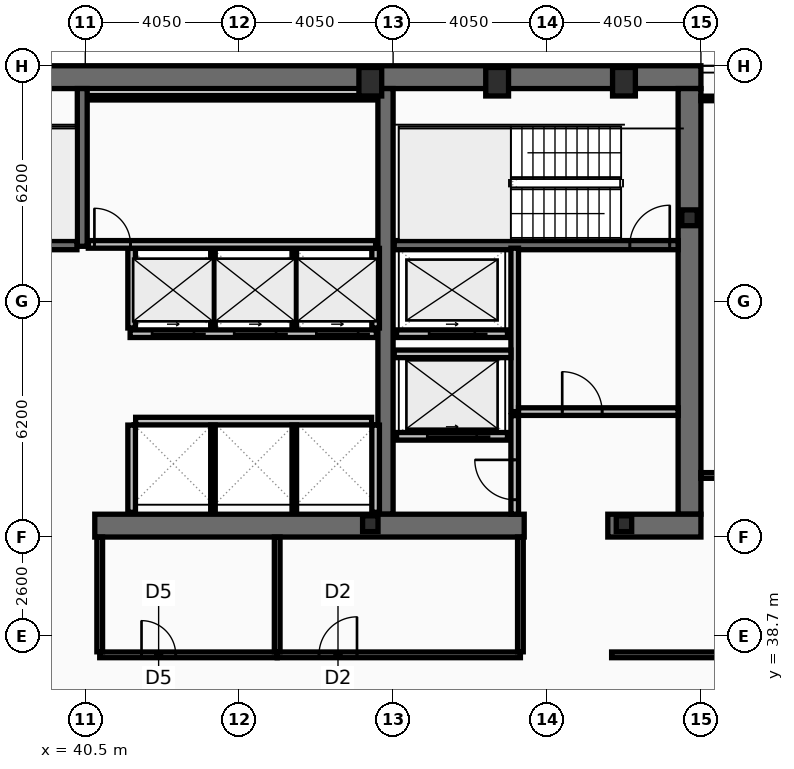
"""IFC4 building model, lengths in metres.
Left out: names, types, materials, properties, quantities, classifications, styles, units other than length and angle.
Written with IfcOpenShell. Run it as: python <this file> out.ifc"""

import sys

from ifc_helpers import new_model, si_unit, direction, frame, frame_2d, origin, origin_2d, place, context, subcontext, project, spatial, rectangle, hollow_rectangle, i_section, extrude, element, fill, save


model = new_model("IFC4")
c1 = context("Model", 3, precision=1e-05, world=origin(), true_north=direction((0.0, 1.0)))
c2 = subcontext(c1, "Body", "Model", "MODEL_VIEW")
j1 = project(units=[si_unit("LENGTHUNIT", "METRE"), si_unit("PLANEANGLEUNIT", "RADIAN")], contexts=[c1])
p1 = place(None, origin())
s1 = spatial("IfcSite", under=j1, at=p1, CompositionType="ELEMENT")
p2 = place(p1, origin())
s2 = spatial("IfcBuilding", under=s1, at=p2, CompositionType="ELEMENT")
p3 = place(p2, frame((0.0, 0.0, 199.4)))
s3 = spatial("IfcBuildingStorey", under=s2, at=p3, CompositionType="ELEMENT", Elevation=199.4)
p4 = place(p3, frame((16.2, 53.4, 0.0), z_axis=(0.0, 0.0, 1.0), x_axis=(1.0, 0.0, 0.0)))
e1 = element("IfcWall", 1, at=p4, inside=s3, PredefinedType="SHEAR", context=c2, shape_type="SweptSolid", body=[
    extrude(rectangle(XDim=40.5, YDim=0.6, at=frame_2d((20.25, 0.0))), origin(), (0.0, 0.0, 1.0), 3.44),
])
p5 = place(p3, frame((56.4, 53.1, 0.0), z_axis=(0.0, 0.0, 1.0), x_axis=(0.0, -1.0, 0.0)))
e2 = element("IfcWall", 2, at=p5, inside=s3, PredefinedType="SHEAR", context=c2, shape_type="SweptSolid", body=[
    extrude(rectangle(XDim=11.2, YDim=0.6, at=frame_2d((5.6, 0.0))), origin(), (0.0, 0.0, 1.0), 3.44),
])
p6 = place(p3, frame((48.4, 41.9, 0.0), z_axis=(0.0, 0.0, 1.0), x_axis=(0.0, 1.0, 0.0)))
e3 = element("IfcWall", 3, at=p6, inside=s3, PredefinedType="SHEAR", context=c2, shape_type="SweptSolid", body=[
    extrude(rectangle(XDim=11.2, YDim=0.4, at=frame_2d((5.6, 0.0))), origin(), (0.0, 0.0, 1.0), 3.44),
])
p7 = place(p3, frame((52.05, 41.6, 0.0), z_axis=(0.0, 0.0, 1.0), x_axis=(-1.0, 0.0, 0.0)))
e4 = element("IfcWall", 4, at=p7, inside=s3, PredefinedType="SHEAR", context=c2, shape_type="SweptSolid", body=[
    extrude(rectangle(XDim=11.3, YDim=0.6, at=frame_2d((5.65, 0.0))), origin(), (0.0, 0.0, 1.0), 3.44),
])
p8 = place(p3, frame((56.7, 41.6, 0.0), z_axis=(0.0, 0.0, 1.0), x_axis=(-1.0, 0.0, 0.0)))
e5 = element("IfcWall", 5, at=p8, inside=s3, PredefinedType="SHEAR", context=c2, shape_type="SweptSolid", body=[
    extrude(rectangle(XDim=2.45, YDim=0.6, at=frame_2d((1.225, 0.0))), origin(), (0.0, 0.0, 1.0), 3.44),
])
p9 = place(p3, frame((40.42, 48.95, 0.0), z_axis=(0.0, 0.0, 1.0), x_axis=(0.0, 1.0, 0.0)))
e6 = element("IfcWall", 6, at=p9, inside=s3, PredefinedType="SHEAR", context=c2, shape_type="SweptSolid", body=[
    extrude(rectangle(XDim=4.15, YDim=0.26, at=frame_2d((2.075, 0.0))), origin(), (0.0, 0.0, 1.0), 3.44),
])
p10 = place(p3, frame((48.63, 48.98, 0.0), z_axis=(0.0, 0.0, 1.0), x_axis=(1.0, 0.0, 0.0)))
e7 = element("IfcWall", 7, at=p10, inside=s3, PredefinedType="SHEAR", context=c2, shape_type="SweptSolid", body=[
    extrude(rectangle(XDim=7.47, YDim=0.24, at=frame_2d((3.735, 0.0))), origin(), (0.0, 0.0, 1.0), 3.44),
])
p11 = place(p10, frame((6.2, 0.0, 0.0)))
e8 = element("IfcOpeningElement", 8, at=p11, cuts=e7, PredefinedType="OPENING", context=c2, shape_type="SweptSolid", body=[
    extrude(rectangle(XDim=1.05, YDim=2.15, at=frame_2d((0.525, 1.075))), frame((0.0, 0.13, 0.0), z_axis=(0.0, -1.0, 0.0), x_axis=(1.0, 0.0, 0.0)), (0.0, 0.0, 1.0), 0.26),
])
p12 = place(p3, frame((32.72, 48.98, 0.0), z_axis=(0.0, 0.0, 1.0), x_axis=(1.0, 0.0, 0.0)))
e9 = element("IfcWall", 9, at=p12, inside=s3, PredefinedType="SHEAR", context=c2, shape_type="SweptSolid", body=[
    extrude(rectangle(XDim=7.56, YDim=0.24, at=frame_2d((3.78, 0.0))), origin(), (0.0, 0.0, 1.0), 3.44),
])
p13 = place(p12, frame((0.22, 0.0, 0.0)))
e10 = element("IfcOpeningElement", 10, at=p13, cuts=e9, PredefinedType="OPENING", context=c2, shape_type="SweptSolid", body=[
    extrude(rectangle(XDim=1.05, YDim=2.15, at=frame_2d((0.525, 1.075))), frame((0.0, 0.13, 0.0), z_axis=(0.0, -1.0, 0.0), x_axis=(1.0, 0.0, 0.0)), (0.0, 0.0, 1.0), 0.26),
])
for number, where, z_axis, x_axis in (
    (11, (48.0, 53.28, 0.0), (0.0, 0.0, 1.0), (1.0, 0.0, 0.0)),
    (12, (51.337, 53.28, 0.0), (0.0, 0.0, 1.0), (1.0, 0.0, 0.0)),
    (13, (54.675, 53.28, 0.0), (0.0, 0.0, 1.0), (1.0, 0.0, 0.0)),
):
    element("IfcColumn", number, at=place(p3, frame(where, z_axis=z_axis, x_axis=x_axis)), inside=s3, PredefinedType="COLUMN", context=c2, shape_type="SweptSolid", body=[
        extrude(hollow_rectangle(XDim=0.6, YDim=0.75, WallThickness=0.045, at=origin_2d()), origin(), (0.0, 0.0, 1.0), 3.6),
    ])
for number, where, z_axis, x_axis in (
    (14, (56.4, 49.7, 0.0), (0.0, 0.0, 1.0), (1.0, 0.0, 0.0)),
    (15, (48.0, 41.65, 0.0), (0.0, 0.0, 1.0), (1.0, 0.0, 0.0)),
    (16, (54.675, 41.65, 0.0), (0.0, 0.0, 1.0), (1.0, 0.0, 0.0)),
):
    element("IfcColumn", number, at=place(p3, frame(where, z_axis=z_axis, x_axis=x_axis)), inside=s3, PredefinedType="COLUMN", context=c2, shape_type="SweptSolid", body=[
        extrude(i_section(OverallWidth=0.406, OverallDepth=0.416, WebThickness=0.03, FlangeThickness=0.048, at=origin_2d()), origin(), (0.0, 0.0, 1.0), 3.6),
    ])
p14 = place(p3, frame((51.61, 43.95, 0.0), z_axis=(0.0, 0.0, 1.0), x_axis=(-1.0, 0.0, 0.0)))
e17 = element("IfcWall", 17, at=p14, inside=s3, PredefinedType="PARTITIONING", context=c2, shape_type="SweptSolid", body=[
    extrude(rectangle(XDim=2.92, YDim=0.2, at=frame_2d((1.46, 0.0))), origin(), (0.0, 0.0, 1.0), 3.44),
])
p15 = place(p14, frame((0.81, 0.0, 0.0)))
e18 = element("IfcOpeningElement", 18, at=p15, cuts=e17, PredefinedType="OPENING", context=c2, shape_type="SweptSolid", body=[
    extrude(rectangle(XDim=1.3, YDim=2.18, at=frame_2d((0.65, 1.09))), frame((0.0, 0.11, 0.0), z_axis=(0.0, -1.0, 0.0), x_axis=(1.0, 0.0, 0.0)), (0.0, 0.0, 1.0), 0.22),
])
p16 = place(p3, frame((51.61, 46.65, 0.0), z_axis=(0.0, 0.0, 1.0), x_axis=(-1.0, 0.0, 0.0)))
e19 = element("IfcWall", 19, at=p16, inside=s3, PredefinedType="PARTITIONING", context=c2, shape_type="SweptSolid", body=[
    extrude(rectangle(XDim=2.92, YDim=0.2, at=frame_2d((1.46, 0.0))), origin(), (0.0, 0.0, 1.0), 3.44),
])
p17 = place(p16, frame((0.86, 0.0, 0.0)))
e20 = element("IfcOpeningElement", 20, at=p17, cuts=e19, PredefinedType="OPENING", context=c2, shape_type="SweptSolid", body=[
    extrude(rectangle(XDim=1.2, YDim=2.18, at=frame_2d((0.6, 1.09))), frame((0.0, 0.11, 0.0), z_axis=(0.0, -1.0, 0.0), x_axis=(1.0, 0.0, 0.0)), (0.0, 0.0, 1.0), 0.22),
])
p18 = place(p3, frame((48.16, 46.65, 0.0), z_axis=(0.0, 0.0, 1.0), x_axis=(-1.0, 0.0, 0.0)))
e21 = element("IfcWall", 21, at=p18, inside=s3, PredefinedType="PARTITIONING", context=c2, shape_type="SweptSolid", body=[
    extrude(rectangle(XDim=6.48, YDim=0.2, at=frame_2d((3.24, 0.0))), origin(), (0.0, 0.0, 1.0), 3.44),
])
p19 = place(p18, frame((4.8, 0.0, 0.0)))
e22 = element("IfcOpeningElement", 22, at=p19, cuts=e21, PredefinedType="OPENING", context=c2, shape_type="SweptSolid", body=[
    extrude(rectangle(XDim=1.1, YDim=2.18, at=frame_2d((0.55, 1.09))), frame((0.0, 0.11, 0.0), z_axis=(0.0, -1.0, 0.0), x_axis=(1.0, 0.0, 0.0)), (0.0, 0.0, 1.0), 0.22),
])
p20 = place(p18, frame((2.64, 0.0, 0.0)))
e23 = element("IfcOpeningElement", 23, at=p20, cuts=e21, PredefinedType="OPENING", context=c2, shape_type="SweptSolid", body=[
    extrude(rectangle(XDim=1.1, YDim=2.18, at=frame_2d((0.55, 1.09))), frame((0.0, 0.11, 0.0), z_axis=(0.0, -1.0, 0.0), x_axis=(1.0, 0.0, 0.0)), (0.0, 0.0, 1.0), 0.22),
])
p21 = place(p18, frame((0.48, 0.0, 0.0)))
e24 = element("IfcOpeningElement", 24, at=p21, cuts=e21, PredefinedType="OPENING", context=c2, shape_type="SweptSolid", body=[
    extrude(rectangle(XDim=1.1, YDim=2.18, at=frame_2d((0.55, 1.09))), frame((0.0, 0.11, 0.0), z_axis=(0.0, -1.0, 0.0), x_axis=(1.0, 0.0, 0.0)), (0.0, 0.0, 1.0), 0.22),
])
p22 = place(p3, frame((51.8, 44.6, 0.0), z_axis=(0.0, 0.0, 1.0), x_axis=(0.0, 1.0, 0.0)))
e25 = element("IfcWall", 25, at=p22, inside=s3, PredefinedType="PARTITIONING", context=c2, shape_type="SweptSolid", body=[
    extrude(rectangle(XDim=4.3, YDim=0.2, at=frame_2d((2.15, 0.0))), origin(), (0.0, 0.0, 1.0), 3.44),
])
p23 = place(p3, frame((51.9, 44.6, 0.0), z_axis=(0.0, 0.0, 1.0), x_axis=(1.0, 0.0, 0.0)))
e26 = element("IfcWall", 26, at=p23, inside=s3, PredefinedType="PARTITIONING", context=c2, shape_type="SweptSolid", body=[
    extrude(rectangle(XDim=4.2, YDim=0.2, at=frame_2d((2.1, 0.0))), origin(), (0.0, 0.0, 1.0), 3.44),
])
p24 = place(p23, frame((1.15, 0.0, 0.0)))
e27 = element("IfcOpeningElement", 27, at=p24, cuts=e26, PredefinedType="OPENING", context=c2, shape_type="SweptSolid", body=[
    extrude(rectangle(XDim=1.05, YDim=2.15, at=frame_2d((0.525, 1.075))), frame((0.0, 0.11, 0.0), z_axis=(0.0, -1.0, 0.0), x_axis=(1.0, 0.0, 0.0)), (0.0, 0.0, 1.0), 0.22),
])
p25 = place(p3, frame((48.63, 46.12, 0.0), z_axis=(0.0, 0.0, 1.0), x_axis=(1.0, 0.0, 0.0)))
e28 = element("IfcWall", 28, at=p25, inside=s3, PredefinedType="PARTITIONING", context=c2, shape_type="SweptSolid", body=[
    extrude(rectangle(XDim=3.07, YDim=0.2, at=frame_2d((1.535, 0.0))), origin(), (0.0, 0.0, 1.0), 3.44),
])
p26 = place(p3, frame((51.8, 41.9, 0.0), z_axis=(0.0, 0.0, 1.0), x_axis=(0.0, 1.0, 0.0)))
e29 = element("IfcWall", 29, at=p26, inside=s3, PredefinedType="PARTITIONING", context=c2, shape_type="SweptSolid", body=[
    extrude(rectangle(XDim=2.595, YDim=0.2, at=frame_2d((1.298, 0.0))), origin(), (0.0, 0.0, 1.0), 3.44),
])
p27 = place(p26, frame((0.38, 0.0, 0.0)))
e30 = element("IfcOpeningElement", 30, at=p27, cuts=e29, PredefinedType="OPENING", context=c2, shape_type="SweptSolid", body=[
    extrude(rectangle(XDim=1.05, YDim=2.15, at=frame_2d((0.525, 1.075))), frame((0.0, 0.11, 0.0), z_axis=(0.0, -1.0, 0.0), x_axis=(1.0, 0.0, 0.0)), (0.0, 0.0, 1.0), 0.22),
])
for number, where, z_axis, x_axis in (
    (31, (41.72, 46.8, 0.0), (0.0, 0.0, 1.0), (0.0, 1.0, 0.0)),
    (32, (48.14, 46.8, 0.0), (0.0, 0.0, 1.0), (0.0, 1.0, 0.0)),
):
    element("IfcWall", number, at=place(p3, frame(where, z_axis=z_axis, x_axis=x_axis)), inside=s3, PredefinedType="PARTITIONING", context=c2, shape_type="SweptSolid", body=[
        extrude(rectangle(XDim=2.095, YDim=0.2, at=frame_2d((1.047, 0.0))), origin(), (0.0, 0.0, 1.0), 3.44),
    ])
for number, where, z_axis, x_axis in (
    (33, (43.86, 46.8, 0.0), (0.0, 0.0, 1.0), (0.0, 1.0, 0.0)),
    (34, (46.0, 46.8, 0.0), (0.0, 0.0, 1.0), (0.0, 1.0, 0.0)),
):
    element("IfcWall", number, at=place(p3, frame(where, z_axis=z_axis, x_axis=x_axis)), inside=s3, PredefinedType="PARTITIONING", context=c2, shape_type="SweptSolid", body=[
        extrude(rectangle(XDim=2.095, YDim=0.12, at=frame_2d((1.047, 0.0))), origin(), (0.0, 0.0, 1.0), 3.44),
    ])
p28 = place(p3, frame((41.825, 44.35, 0.0), z_axis=(0.0, 0.0, 1.0), x_axis=(1.0, 0.0, 0.0)))
e35 = element("IfcWall", 35, at=p28, inside=s3, PredefinedType="PARTITIONING", context=c2, shape_type="SweptSolid", body=[
    extrude(rectangle(XDim=6.21, YDim=0.2, at=frame_2d((3.105, 0.0))), origin(), (0.0, 0.0, 1.0), 3.44),
])
for number, where, z_axis, x_axis in (
    (36, (41.72, 41.95, 0.0), (0.0, 0.0, 1.0), (0.0, 1.0, 0.0)),
    (37, (48.14, 41.95, 0.0), (0.0, 0.0, 1.0), (0.0, 1.0, 0.0)),
):
    element("IfcWall", number, at=place(p3, frame(where, z_axis=z_axis, x_axis=x_axis)), inside=s3, PredefinedType="PARTITIONING", context=c2, shape_type="SweptSolid", body=[
        extrude(rectangle(XDim=2.295, YDim=0.2, at=frame_2d((1.147, 0.0))), origin(), (0.0, 0.0, 1.0), 3.44),
    ])
for number, where, z_axis, x_axis in (
    (38, (43.86, 41.95, 0.0), (0.0, 0.0, 1.0), (0.0, 1.0, 0.0)),
    (39, (46.0, 41.95, 0.0), (0.0, 0.0, 1.0), (0.0, 1.0, 0.0)),
):
    element("IfcWall", number, at=place(p3, frame(where, z_axis=z_axis, x_axis=x_axis)), inside=s3, PredefinedType="PARTITIONING", context=c2, shape_type="SweptSolid", body=[
        extrude(rectangle(XDim=2.295, YDim=0.12, at=frame_2d((1.147, 0.0))), origin(), (0.0, 0.0, 1.0), 3.44),
    ])
p29 = place(p3, frame((40.58, 52.86, 0.0), z_axis=(0.0, 0.0, 1.0), x_axis=(1.0, 0.0, 0.0)))
e40 = element("IfcWall", 40, at=p29, inside=s3, PredefinedType="PARTITIONING", context=c2, shape_type="SweptSolid", body=[
    extrude(rectangle(XDim=7.56, YDim=0.12, at=frame_2d((3.78, 0.0))), origin(), (0.0, 0.0, 1.0), 3.44),
])
p30 = place(p3, frame((40.58, 49.0, 0.0), z_axis=(0.0, 0.0, 1.0), x_axis=(1.0, 0.0, 0.0)))
e41 = element("IfcWall", 41, at=p30, inside=s3, PredefinedType="PARTITIONING", context=c2, shape_type="SweptSolid", body=[
    extrude(rectangle(XDim=7.56, YDim=0.2, at=frame_2d((3.78, 0.0))), origin(), (0.0, 0.0, 1.0), 3.44),
])
p31 = place(p30, frame((0.16, 0.0, 0.0)))
e42 = element("IfcOpeningElement", 42, at=p31, cuts=e41, PredefinedType="OPENING", context=c2, shape_type="SweptSolid", body=[
    extrude(rectangle(XDim=0.95, YDim=2.1, at=frame_2d((0.475, 1.05))), frame((0.0, 0.11, 0.0), z_axis=(0.0, -1.0, 0.0), x_axis=(1.0, 0.0, 0.0)), (0.0, 0.0, 1.0), 0.22),
])
p32 = place(p3, frame((40.88, 38.2, 0.0), z_axis=(0.0, 0.0, 1.0), x_axis=(1.0, 0.0, 0.0)))
e43 = element("IfcWall", 43, at=p32, inside=s3, PredefinedType="PARTITIONING", context=c2, shape_type="SweptSolid", body=[
    extrude(rectangle(XDim=4.67, YDim=0.15, at=frame_2d((2.335, 0.0))), origin(), (0.0, 0.0, 1.0), 2.73),
])
p33 = place(p32, frame((1.1, 0.0, 0.0)))
e44 = element("IfcOpeningElement", 44, at=p33, cuts=e43, PredefinedType="OPENING", context=c2, shape_type="SweptSolid", body=[
    extrude(rectangle(XDim=0.9, YDim=2.05, at=frame_2d((0.45, 1.025))), frame((0.0, 0.085, 0.0), z_axis=(0.0, -1.0, 0.0), x_axis=(1.0, 0.0, 0.0)), (0.0, 0.0, 1.0), 0.17),
])
p34 = place(p3, frame((45.55, 38.2, 0.0), z_axis=(0.0, 0.0, 1.0), x_axis=(1.0, 0.0, 0.0)))
e45 = element("IfcWall", 45, at=p34, inside=s3, PredefinedType="PARTITIONING", context=c2, shape_type="SweptSolid", body=[
    extrude(rectangle(XDim=6.4, YDim=0.15, at=frame_2d((3.2, 0.0))), origin(), (0.0, 0.0, 1.0), 2.73),
])
p35 = place(p34, frame((1.1, 0.0, 0.0)))
e46 = element("IfcOpeningElement", 46, at=p35, cuts=e45, PredefinedType="OPENING", context=c2, shape_type="SweptSolid", body=[
    extrude(rectangle(XDim=1.0, YDim=2.05, at=frame_2d((0.5, 1.025))), frame((0.0, 0.085, 0.0), z_axis=(0.0, -1.0, 0.0), x_axis=(1.0, 0.0, 0.0)), (0.0, 0.0, 1.0), 0.17),
])
for number, where, z_axis, x_axis in (
    (47, (40.88, 38.28, 0.0), (0.0, 0.0, 1.0), (0.0, 1.0, 0.0)),
    (48, (45.55, 38.28, 0.0), (0.0, 0.0, 1.0), (0.0, 1.0, 0.0)),
    (49, (51.95, 38.28, 0.0), (0.0, 0.0, 1.0), (0.0, 1.0, 0.0)),
):
    element("IfcWall", number, at=place(p3, frame(where, z_axis=z_axis, x_axis=x_axis)), inside=s3, PredefinedType="PARTITIONING", context=c2, shape_type="SweptSolid", body=[
        extrude(rectangle(XDim=3.02, YDim=0.15, at=frame_2d((1.51, 0.0))), origin(), (0.0, 0.0, 1.0), 3.44),
    ])
p36 = place(p3, frame((54.35, 38.2, 0.0), z_axis=(0.0, 0.0, 1.0), x_axis=(1.0, 0.0, 0.0)))
e50 = element("IfcWall", 50, at=p36, inside=s3, PredefinedType="PARTITIONING", context=c2, shape_type="SweptSolid", body=[
    extrude(rectangle(XDim=10.52, YDim=0.15, at=frame_2d((5.26, 0.0))), origin(), (0.0, 0.0, 1.0), 2.73),
])
p37 = place(p36, frame((3.25, 0.0, 0.0)))
e51 = element("IfcOpeningElement", 51, at=p37, cuts=e50, PredefinedType="OPENING", context=c2, shape_type="SweptSolid", body=[
    extrude(rectangle(XDim=0.95, YDim=2.05, at=frame_2d((0.475, 1.025))), frame((0.0, 0.085, 0.0), z_axis=(0.0, -1.0, 0.0), x_axis=(1.0, 0.0, 0.0)), (0.0, 0.0, 1.0), 0.17),
])
p38 = place(p3, frame((56.7, 42.92, 0.0), z_axis=(0.0, 0.0, 1.0), x_axis=(1.0, 0.0, 0.0)))
e52 = element("IfcWall", 52, at=p38, inside=s3, PredefinedType="PARTITIONING", context=c2, shape_type="SweptSolid", body=[
    extrude(rectangle(XDim=8.105, YDim=0.15, at=frame_2d((4.052, 0.0))), origin(), (0.0, 0.0, 1.0), 2.73),
])
p39 = place(p38, frame((0.9, 0.0, 0.0)))
e53 = element("IfcOpeningElement", 53, at=p39, cuts=e52, PredefinedType="OPENING", context=c2, shape_type="SweptSolid", body=[
    extrude(rectangle(XDim=0.9, YDim=2.05, at=frame_2d((0.45, 1.025))), frame((0.0, 0.085, 0.0), z_axis=(0.0, -1.0, 0.0), x_axis=(1.0, 0.0, 0.0)), (0.0, 0.0, 1.0), 0.17),
])
p40 = place(p3, frame((56.7, 52.84, 0.0), z_axis=(0.0, 0.0, 1.0), x_axis=(1.0, 0.0, 0.0)))
e54 = element("IfcWall", 54, at=p40, inside=s3, PredefinedType="PARTITIONING", context=c2, shape_type="SweptSolid", body=[
    extrude(rectangle(XDim=8.105, YDim=0.12, at=frame_2d((4.052, 0.0))), origin(), (0.0, 0.0, 1.0), 3.44),
])
p41 = place(p11, origin())
e55 = element("IfcDoor", 55, at=p41, inside=s3, OperationType="SINGLE_SWING_RIGHT", PredefinedType="DOOR", context=c2, shape_type="SweptSolid", body=[
    extrude(rectangle(XDim=1.05, YDim=2.15, at=frame_2d((0.525, 1.075))), frame((0.0, 0.025, 0.0), z_axis=(0.0, -1.0, 0.0), x_axis=(1.0, 0.0, 0.0)), (0.0, 0.0, 1.0), 0.05),
])
fill(e8, e55)
p42 = place(p15, origin())
e56 = element("IfcDoor", 56, at=p42, inside=s3, OperationType="SLIDING_TO_LEFT", PredefinedType="DOOR", context=c2, shape_type="SweptSolid", body=[
    extrude(rectangle(XDim=1.3, YDim=2.18, at=frame_2d((0.65, 1.09))), frame((0.0, 0.025, 0.0), z_axis=(0.0, -1.0, 0.0), x_axis=(1.0, 0.0, 0.0)), (0.0, 0.0, 1.0), 0.05),
])
fill(e18, e56)
p43 = place(p17, origin())
e57 = element("IfcDoor", 57, at=p43, inside=s3, OperationType="SLIDING_TO_LEFT", PredefinedType="DOOR", context=c2, shape_type="SweptSolid", body=[
    extrude(rectangle(XDim=1.2, YDim=2.18, at=frame_2d((0.6, 1.09))), frame((0.0, 0.025, 0.0), z_axis=(0.0, -1.0, 0.0), x_axis=(1.0, 0.0, 0.0)), (0.0, 0.0, 1.0), 0.05),
])
fill(e20, e57)
p44 = place(p19, origin())
e58 = element("IfcDoor", 58, at=p44, inside=s3, OperationType="SLIDING_TO_LEFT", PredefinedType="DOOR", context=c2, shape_type="SweptSolid", body=[
    extrude(rectangle(XDim=1.1, YDim=2.18, at=frame_2d((0.55, 1.09))), frame((0.0, 0.025, 0.0), z_axis=(0.0, -1.0, 0.0), x_axis=(1.0, 0.0, 0.0)), (0.0, 0.0, 1.0), 0.05),
])
fill(e22, e58)
p45 = place(p20, origin())
e59 = element("IfcDoor", 59, at=p45, inside=s3, OperationType="SLIDING_TO_LEFT", PredefinedType="DOOR", context=c2, shape_type="SweptSolid", body=[
    extrude(rectangle(XDim=1.1, YDim=2.18, at=frame_2d((0.55, 1.09))), frame((0.0, 0.025, 0.0), z_axis=(0.0, -1.0, 0.0), x_axis=(1.0, 0.0, 0.0)), (0.0, 0.0, 1.0), 0.05),
])
fill(e23, e59)
p46 = place(p21, origin())
e60 = element("IfcDoor", 60, at=p46, inside=s3, OperationType="SLIDING_TO_LEFT", PredefinedType="DOOR", context=c2, shape_type="SweptSolid", body=[
    extrude(rectangle(XDim=1.1, YDim=2.18, at=frame_2d((0.55, 1.09))), frame((0.0, 0.025, 0.0), z_axis=(0.0, -1.0, 0.0), x_axis=(1.0, 0.0, 0.0)), (0.0, 0.0, 1.0), 0.05),
])
fill(e24, e60)
p47 = place(p24, origin())
e61 = element("IfcDoor", 61, at=p47, inside=s3, OperationType="SINGLE_SWING_LEFT", PredefinedType="DOOR", context=c2, shape_type="SweptSolid", body=[
    extrude(rectangle(XDim=1.05, YDim=2.15, at=frame_2d((0.525, 1.075))), frame((0.0, 0.025, 0.0), z_axis=(0.0, -1.0, 0.0), x_axis=(1.0, 0.0, 0.0)), (0.0, 0.0, 1.0), 0.05),
])
fill(e27, e61)
p48 = place(p27, origin())
e62 = element("IfcDoor", 62, at=p48, inside=s3, OperationType="SINGLE_SWING_RIGHT", PredefinedType="DOOR", context=c2, shape_type="SweptSolid", body=[
    extrude(rectangle(XDim=1.05, YDim=2.15, at=frame_2d((0.525, 1.075))), frame((0.0, 0.025, 0.0), z_axis=(0.0, -1.0, 0.0), x_axis=(1.0, 0.0, 0.0)), (0.0, 0.0, 1.0), 0.05),
])
fill(e30, e62)
p49 = place(p31, origin())
e63 = element("IfcDoor", 63, at=p49, inside=s3, OperationType="SINGLE_SWING_LEFT", PredefinedType="DOOR", context=c2, shape_type="SweptSolid", body=[
    extrude(rectangle(XDim=0.95, YDim=2.1, at=frame_2d((0.475, 1.05))), frame((0.0, 0.025, 0.0), z_axis=(0.0, -1.0, 0.0), x_axis=(1.0, 0.0, 0.0)), (0.0, 0.0, 1.0), 0.05),
])
fill(e42, e63)
p50 = place(p33, origin())
e64 = element("IfcDoor", 64, at=p50, inside=s3, OperationType="SINGLE_SWING_LEFT", PredefinedType="DOOR", context=c2, shape_type="SweptSolid", body=[
    extrude(rectangle(XDim=0.9, YDim=2.05, at=frame_2d((0.45, 1.025))), frame((0.0, 0.025, 0.0), z_axis=(0.0, -1.0, 0.0), x_axis=(1.0, 0.0, 0.0)), (0.0, 0.0, 1.0), 0.05),
])
fill(e44, e64)
p51 = place(p35, origin())
e65 = element("IfcDoor", 65, at=p51, inside=s3, OperationType="SINGLE_SWING_RIGHT", PredefinedType="DOOR", context=c2, shape_type="SweptSolid", body=[
    extrude(rectangle(XDim=1.0, YDim=2.05, at=frame_2d((0.5, 1.025))), frame((0.0, 0.025, 0.0), z_axis=(0.0, -1.0, 0.0), x_axis=(1.0, 0.0, 0.0)), (0.0, 0.0, 1.0), 0.05),
])
fill(e46, e65)
save(model, sys.argv[1])
